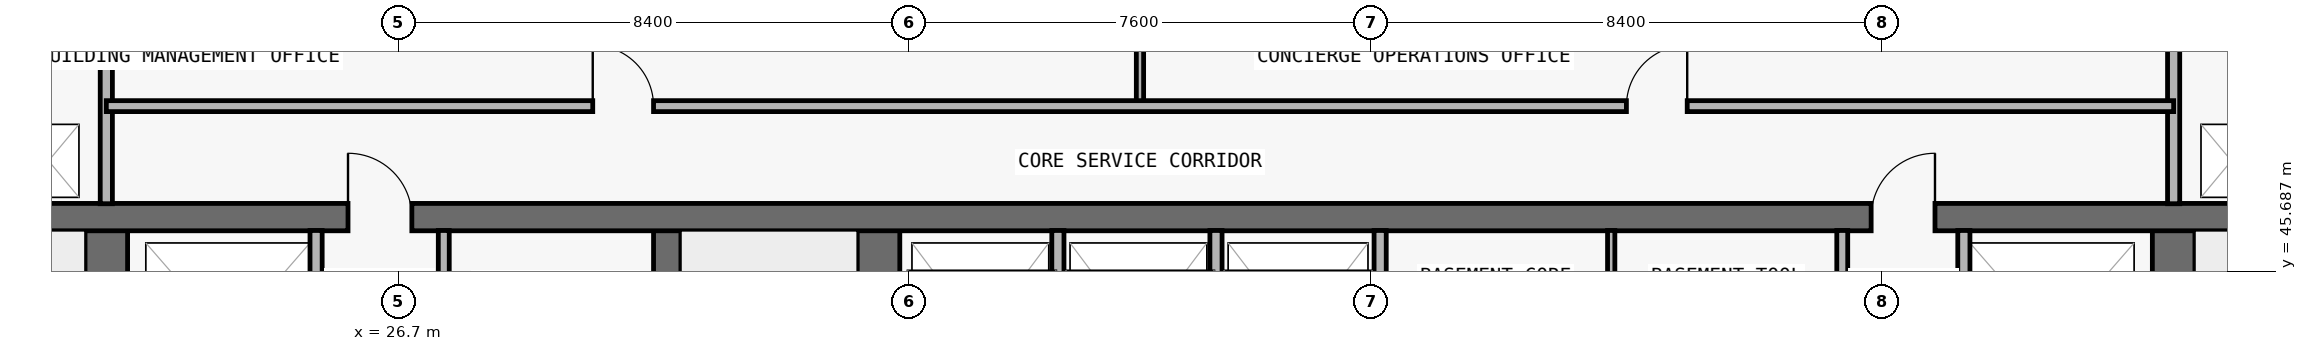
"""IFC4 building model, lengths in metres.
Left out: names, types, materials, properties, quantities, classifications, styles, units other than length and angle.
Written with IfcOpenShell. Run it as: python <this file> out.ifc"""

import sys

from ifc_helpers import new_model, si_unit, direction, frame, frame_2d, origin, place, context, subcontext, project, spatial, rectangle, extrude, element, fill, save


model = new_model("IFC4")
c1 = context("Model", 3, precision=1e-05, world=origin(), true_north=direction((0.0, 1.0)))
c2 = subcontext(c1, "Body", "Model", "MODEL_VIEW")
j1 = project(units=[si_unit("LENGTHUNIT", "METRE"), si_unit("PLANEANGLEUNIT", "RADIAN")], contexts=[c1])
p1 = place(None, origin())
s1 = spatial("IfcSite", under=j1, at=p1, CompositionType="ELEMENT")
p2 = place(p1, origin())
s2 = spatial("IfcBuilding", under=s1, at=p2, CompositionType="ELEMENT")
p3 = place(p2, frame((0.0, 0.0, -4.5)))
s3 = spatial("IfcBuildingStorey", under=s2, at=p3, CompositionType="ELEMENT", Elevation=-4.5)
p4 = place(p3, frame((21.9, 36.9, 0.0), z_axis=(0.0, 0.0, 1.0), x_axis=(0.0, 1.0, 0.0)))
e1 = element("IfcWall", 1, at=p4, inside=s3, PredefinedType="SHEAR", context=c2, shape_type="SweptSolid", body=[
    extrude(rectangle(XDim=9.675, YDim=0.7, at=frame_2d((4.837, 0.0))), origin(), (0.0, 0.0, 1.0), 4.2),
])
p5 = place(p4, frame((0.65, 0.0, 0.0)))
e2 = element("IfcOpeningElement", 2, at=p5, cuts=e1, PredefinedType="OPENING", context=c2, shape_type="SweptSolid", body=[
    extrude(rectangle(XDim=1.1, YDim=2.15, at=frame_2d((0.55, 1.075))), frame((0.0, 0.36, 0.0), z_axis=(0.0, -1.0, 0.0), x_axis=(1.0, 0.0, 0.0)), (0.0, 0.0, 1.0), 0.72),
])
p6 = place(p3, frame((55.9, 36.9, 0.0), z_axis=(0.0, 0.0, 1.0), x_axis=(0.0, 1.0, 0.0)))
e3 = element("IfcWall", 3, at=p6, inside=s3, PredefinedType="SHEAR", context=c2, shape_type="SweptSolid", body=[
    extrude(rectangle(XDim=9.675, YDim=0.7, at=frame_2d((4.837, 0.0))), origin(), (0.0, 0.0, 1.0), 4.2),
])
p7 = place(p6, frame((0.65, 0.0, 0.0)))
e4 = element("IfcOpeningElement", 4, at=p7, cuts=e3, PredefinedType="OPENING", context=c2, shape_type="SweptSolid", body=[
    extrude(rectangle(XDim=1.1, YDim=2.15, at=frame_2d((0.55, 1.075))), frame((0.0, 0.36, 0.0), z_axis=(0.0, -1.0, 0.0), x_axis=(1.0, 0.0, 0.0)), (0.0, 0.0, 1.0), 0.72),
])
p8 = place(p3, frame((31.125, 36.9, 0.0), z_axis=(0.0, 0.0, 1.0), x_axis=(0.0, 1.0, 0.0)))
e5 = element("IfcWall", 5, at=p8, inside=s3, PredefinedType="SHEAR", context=c2, shape_type="SweptSolid", body=[
    extrude(rectangle(XDim=9.675, YDim=0.45, at=frame_2d((4.837, 0.0))), origin(), (0.0, 0.0, 1.0), 4.2),
])
p9 = place(p3, frame((34.6, 36.9, 0.0), z_axis=(0.0, 0.0, 1.0), x_axis=(0.0, 1.0, 0.0)))
e6 = element("IfcWall", 6, at=p9, inside=s3, PredefinedType="SHEAR", context=c2, shape_type="SweptSolid", body=[
    extrude(rectangle(XDim=9.675, YDim=0.7, at=frame_2d((4.837, 0.0))), origin(), (0.0, 0.0, 1.0), 4.2),
])
p10 = place(p3, frame((18.2, 46.575, 0.0), z_axis=(0.0, 0.0, 1.0), x_axis=(1.0, 0.0, 0.0)))
e7 = element("IfcWall", 7, at=p10, inside=s3, PredefinedType="SHEAR", context=c2, shape_type="SweptSolid", body=[
    extrude(rectangle(XDim=41.4, YDim=0.45, at=frame_2d((20.7, 0.0))), origin(), (0.0, 0.0, 1.0), 4.2),
])
p11 = place(p10, frame((7.675, 0.0, 0.0)))
e8 = element("IfcOpeningElement", 8, at=p11, cuts=e7, PredefinedType="OPENING", context=c2, shape_type="SweptSolid", body=[
    extrude(rectangle(XDim=1.05, YDim=2.15, at=frame_2d((0.525, 1.075))), frame((0.0, 0.235, 0.0), z_axis=(0.0, -1.0, 0.0), x_axis=(1.0, 0.0, 0.0)), (0.0, 0.0, 1.0), 0.47),
])
p12 = place(p10, frame((32.725, 0.0, 0.0)))
e9 = element("IfcOpeningElement", 9, at=p12, cuts=e7, PredefinedType="OPENING", context=c2, shape_type="SweptSolid", body=[
    extrude(rectangle(XDim=1.05, YDim=2.15, at=frame_2d((0.525, 1.075))), frame((0.0, 0.235, 0.0), z_axis=(0.0, -1.0, 0.0), x_axis=(1.0, 0.0, 0.0)), (0.0, 0.0, 1.0), 0.47),
])
p13 = place(p3, frame((21.9, 46.795, 0.0), z_axis=(0.0, 0.0, 1.0), x_axis=(0.0, 1.0, 0.0)))
e10 = element("IfcWall", 10, at=p13, inside=s3, PredefinedType="PARTITIONING", context=c2, shape_type="SweptSolid", body=[
    extrude(rectangle(XDim=2.91, YDim=0.2, at=frame_2d((1.455, 0.0))), origin(), (0.0, 0.0, 1.0), 4.2),
])
p14 = place(p3, frame((25.35, 43.17, 0.0), z_axis=(0.0, 0.0, 1.0), x_axis=(0.0, 1.0, 0.0)))
e11 = element("IfcWall", 11, at=p14, inside=s3, PredefinedType="PARTITIONING", context=c2, shape_type="SweptSolid", body=[
    extrude(rectangle(XDim=3.185, YDim=0.2, at=frame_2d((1.593, 0.0))), origin(), (0.0, 0.0, 1.0), 4.2),
])
p15 = place(p3, frame((27.45, 43.17, 0.0), z_axis=(0.0, 0.0, 1.0), x_axis=(0.0, 1.0, 0.0)))
e12 = element("IfcWall", 12, at=p15, inside=s3, PredefinedType="PARTITIONING", context=c2, shape_type="SweptSolid", body=[
    extrude(rectangle(XDim=3.185, YDim=0.18, at=frame_2d((1.593, 0.0))), origin(), (0.0, 0.0, 1.0), 4.2),
])
p16 = place(p3, frame((37.55, 43.17, 0.0), z_axis=(0.0, 0.0, 1.0), x_axis=(0.0, 1.0, 0.0)))
e13 = element("IfcWall", 13, at=p16, inside=s3, PredefinedType="PARTITIONING", context=c2, shape_type="SweptSolid", body=[
    extrude(rectangle(XDim=3.185, YDim=0.2, at=frame_2d((1.593, 0.0))), origin(), (0.0, 0.0, 1.0), 4.2),
])
p17 = place(p3, frame((38.9, 48.4, 0.0), z_axis=(0.0, 0.0, 1.0), x_axis=(0.0, 1.0, 0.0)))
e14 = element("IfcWall", 14, at=p17, inside=s3, PredefinedType="PARTITIONING", context=c2, shape_type="SweptSolid", body=[
    extrude(rectangle(XDim=1.305, YDim=0.12, at=frame_2d((0.653, 0.0))), origin(), (0.0, 0.0, 1.0), 4.2),
])
for number, where, z_axis, x_axis in (
    (15, (40.15, 43.17, 0.0), (0.0, 0.0, 1.0), (0.0, 1.0, 0.0)),
    (16, (42.85, 43.17, 0.0), (0.0, 0.0, 1.0), (0.0, 1.0, 0.0)),
):
    element("IfcWall", number, at=place(p3, frame(where, z_axis=z_axis, x_axis=x_axis)), inside=s3, PredefinedType="PARTITIONING", context=c2, shape_type="SweptSolid", body=[
        extrude(rectangle(XDim=3.185, YDim=0.2, at=frame_2d((1.593, 0.0))), origin(), (0.0, 0.0, 1.0), 4.2),
    ])
p18 = place(p3, frame((46.65, 43.17, 0.0), z_axis=(0.0, 0.0, 1.0), x_axis=(0.0, 1.0, 0.0)))
e17 = element("IfcWall", 17, at=p18, inside=s3, PredefinedType="PARTITIONING", context=c2, shape_type="SweptSolid", body=[
    extrude(rectangle(XDim=3.185, YDim=0.12, at=frame_2d((1.593, 0.0))), origin(), (0.0, 0.0, 1.0), 4.2),
])
p19 = place(p3, frame((50.45, 43.17, 0.0), z_axis=(0.0, 0.0, 1.0), x_axis=(0.0, 1.0, 0.0)))
e18 = element("IfcWall", 18, at=p19, inside=s3, PredefinedType="PARTITIONING", context=c2, shape_type="SweptSolid", body=[
    extrude(rectangle(XDim=3.185, YDim=0.18, at=frame_2d((1.593, 0.0))), origin(), (0.0, 0.0, 1.0), 4.2),
])
p20 = place(p3, frame((52.45, 43.17, 0.0), z_axis=(0.0, 0.0, 1.0), x_axis=(0.0, 1.0, 0.0)))
e19 = element("IfcWall", 19, at=p20, inside=s3, PredefinedType="PARTITIONING", context=c2, shape_type="SweptSolid", body=[
    extrude(rectangle(XDim=3.185, YDim=0.2, at=frame_2d((1.593, 0.0))), origin(), (0.0, 0.0, 1.0), 4.2),
])
p21 = place(p3, frame((55.9, 46.795, 0.0), z_axis=(0.0, 0.0, 1.0), x_axis=(0.0, 1.0, 0.0)))
e20 = element("IfcWall", 20, at=p21, inside=s3, PredefinedType="PARTITIONING", context=c2, shape_type="SweptSolid", body=[
    extrude(rectangle(XDim=2.91, YDim=0.2, at=frame_2d((1.455, 0.0))), origin(), (0.0, 0.0, 1.0), 4.2),
])
p22 = place(p3, frame((21.9, 48.4, 0.0), z_axis=(0.0, 0.0, 1.0), x_axis=(1.0, 0.0, 0.0)))
e21 = element("IfcWall", 21, at=p22, inside=s3, PredefinedType="PARTITIONING", context=c2, shape_type="SweptSolid", body=[
    extrude(rectangle(XDim=34.0, YDim=0.18, at=frame_2d((17.0, 0.0))), origin(), (0.0, 0.0, 1.0), 4.2),
])
p23 = place(p22, frame((8.0, 0.0, 0.0)))
e22 = element("IfcOpeningElement", 22, at=p23, cuts=e21, PredefinedType="OPENING", context=c2, shape_type="SweptSolid", body=[
    extrude(rectangle(XDim=1.0, YDim=2.2, at=frame_2d((0.5, 1.1))), frame((0.0, 0.1, 0.0), z_axis=(0.0, -1.0, 0.0), x_axis=(1.0, 0.0, 0.0)), (0.0, 0.0, 1.0), 0.2),
])
p24 = place(p22, frame((25.0, 0.0, 0.0)))
e23 = element("IfcOpeningElement", 23, at=p24, cuts=e21, PredefinedType="OPENING", context=c2, shape_type="SweptSolid", body=[
    extrude(rectangle(XDim=1.0, YDim=2.2, at=frame_2d((0.5, 1.1))), frame((0.0, 0.1, 0.0), z_axis=(0.0, -1.0, 0.0), x_axis=(1.0, 0.0, 0.0)), (0.0, 0.0, 1.0), 0.2),
])
p25 = place(p11, origin())
e24 = element("IfcDoor", 24, at=p25, inside=s3, OperationType="SINGLE_SWING_LEFT", PredefinedType="DOOR", context=c2, shape_type="SweptSolid", body=[
    extrude(rectangle(XDim=1.05, YDim=2.15, at=frame_2d((0.525, 1.075))), frame((0.0, 0.025, 0.0), z_axis=(0.0, -1.0, 0.0), x_axis=(1.0, 0.0, 0.0)), (0.0, 0.0, 1.0), 0.05),
])
fill(e8, e24)
p26 = place(p12, origin())
e25 = element("IfcDoor", 25, at=p26, inside=s3, OperationType="SINGLE_SWING_RIGHT", PredefinedType="DOOR", context=c2, shape_type="SweptSolid", body=[
    extrude(rectangle(XDim=1.05, YDim=2.15, at=frame_2d((0.525, 1.075))), frame((0.0, 0.025, 0.0), z_axis=(0.0, -1.0, 0.0), x_axis=(1.0, 0.0, 0.0)), (0.0, 0.0, 1.0), 0.05),
])
fill(e9, e25)
p27 = place(p23, origin())
e26 = element("IfcDoor", 26, at=p27, inside=s3, OperationType="SINGLE_SWING_LEFT", PredefinedType="DOOR", context=c2, shape_type="SweptSolid", body=[
    extrude(rectangle(XDim=1.0, YDim=2.2, at=frame_2d((0.5, 1.1))), frame((0.0, 0.025, 0.0), z_axis=(0.0, -1.0, 0.0), x_axis=(1.0, 0.0, 0.0)), (0.0, 0.0, 1.0), 0.05),
])
fill(e22, e26)
p28 = place(p24, origin())
e27 = element("IfcDoor", 27, at=p28, inside=s3, OperationType="SINGLE_SWING_RIGHT", PredefinedType="DOOR", context=c2, shape_type="SweptSolid", body=[
    extrude(rectangle(XDim=1.0, YDim=2.2, at=frame_2d((0.5, 1.1))), frame((0.0, 0.025, 0.0), z_axis=(0.0, -1.0, 0.0), x_axis=(1.0, 0.0, 0.0)), (0.0, 0.0, 1.0), 0.05),
])
fill(e23, e27)
save(model, sys.argv[1])
